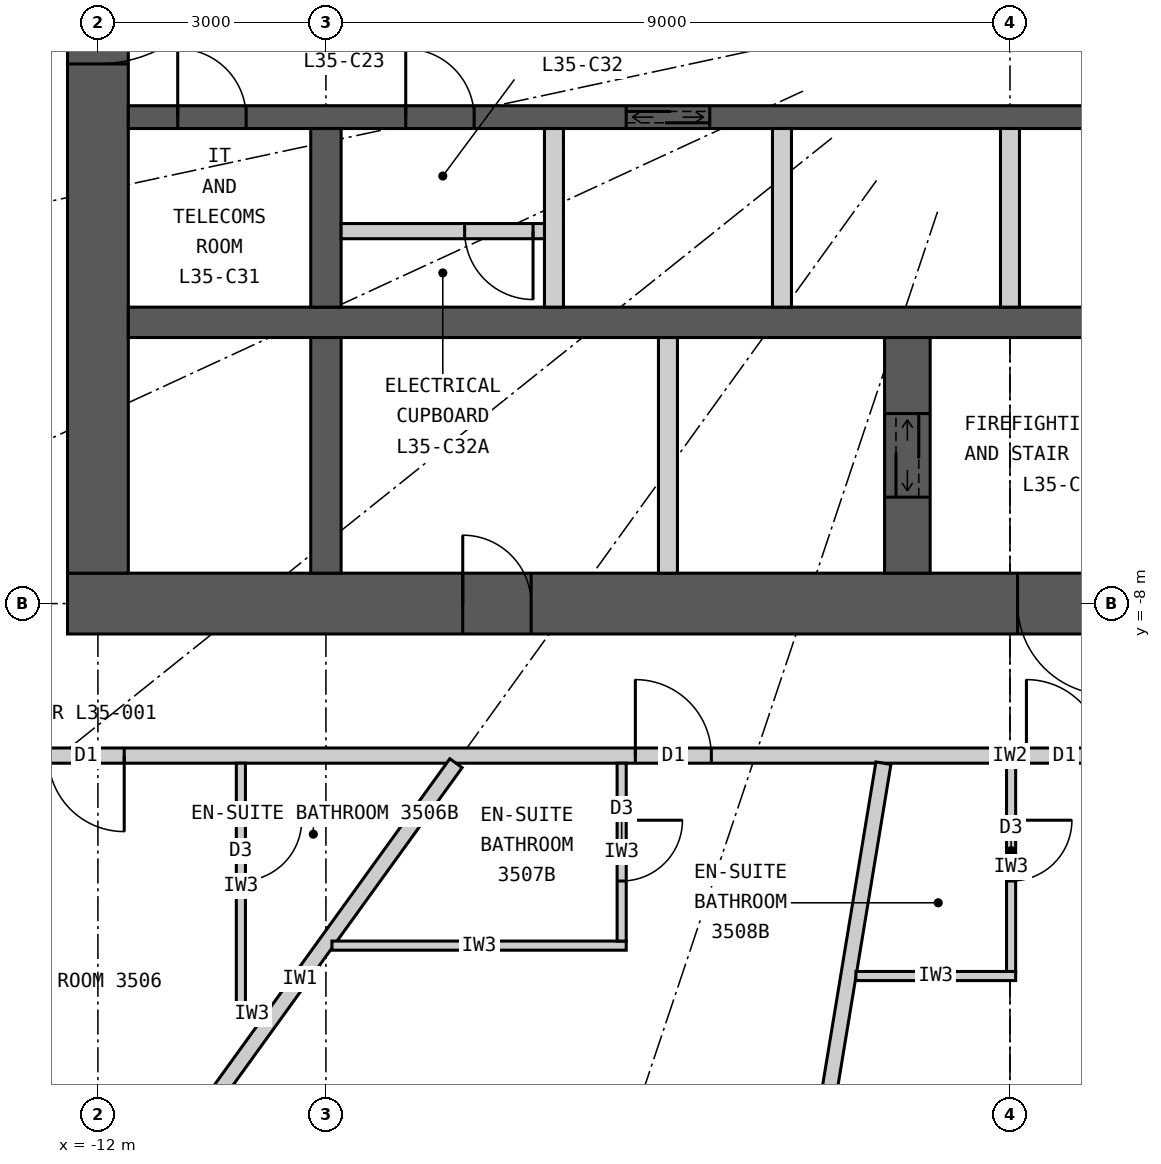
"""IFC4 building model, lengths in metres.
Left out: names, types, materials, properties, quantities, classifications, styles, units other than length and angle.
Written with IfcOpenShell. Run it as: python <this file> out.ifc"""

import sys

from ifc_helpers import new_model, si_unit, direction, frame, frame_2d, origin, place, context, subcontext, project, spatial, rectangle, extrude, element, fill, save


model = new_model("IFC4")
c1 = context("Model", 3, precision=1e-05, world=origin(), true_north=direction((0.0, 1.0)))
c2 = subcontext(c1, "Body", "Model", "MODEL_VIEW")
j1 = project(units=[si_unit("LENGTHUNIT", "METRE"), si_unit("PLANEANGLEUNIT", "RADIAN")], contexts=[c1])
p1 = place(None, origin())
s1 = spatial("IfcSite", under=j1, at=p1, CompositionType="ELEMENT")
p2 = place(p1, origin())
s2 = spatial("IfcBuilding", under=s1, at=p2, CompositionType="ELEMENT")
p3 = place(p2, frame((0.0, 0.0, 135.3)))
s3 = spatial("IfcBuildingStorey", under=s2, at=p3, CompositionType="ELEMENT", Elevation=135.3)
p4 = place(p3, frame((12.4, -8.0, 0.0), z_axis=(0.0, 0.0, 1.0), x_axis=(-1.0, 0.0, 0.0)))
e1 = element("IfcWall", 1, at=p4, inside=s3, PredefinedType="SHEAR", context=c2, shape_type="SweptSolid", body=[
    extrude(rectangle(XDim=24.8, YDim=0.8, at=frame_2d((12.4, 0.0))), origin(), (0.0, 0.0, 1.0), 3.3),
])
p5 = place(p4, frame((11.1, 0.0, 0.0)))
e2 = element("IfcOpeningElement", 2, at=p5, cuts=e1, PredefinedType="OPENING", context=c2, shape_type="SweptSolid", body=[
    extrude(rectangle(XDim=1.2, YDim=2.2, at=frame_2d((0.6, 1.1))), frame((0.0, 0.41, 0.0), z_axis=(0.0, -1.0, 0.0), x_axis=(1.0, 0.0, 0.0)), (0.0, 0.0, 1.0), 0.82),
])
p6 = place(p4, frame((18.7, 0.0, 0.0)))
e3 = element("IfcOpeningElement", 3, at=p6, cuts=e1, PredefinedType="OPENING", context=c2, shape_type="SweptSolid", body=[
    extrude(rectangle(XDim=0.9, YDim=2.2, at=frame_2d((0.45, 1.1))), frame((0.0, 0.41, 0.0), z_axis=(0.0, -1.0, 0.0), x_axis=(1.0, 0.0, 0.0)), (0.0, 0.0, 1.0), 0.82),
])
p7 = place(p3, frame((-12.0, 7.6, 0.0), z_axis=(0.0, 0.0, 1.0), x_axis=(0.0, -1.0, 0.0)))
e4 = element("IfcWall", 4, at=p7, inside=s3, PredefinedType="SHEAR", context=c2, shape_type="SweptSolid", body=[
    extrude(rectangle(XDim=15.2, YDim=0.8, at=frame_2d((7.6, 0.0))), origin(), (0.0, 0.0, 1.0), 3.3),
])
p8 = place(p7, frame((6.7, 0.0, 0.0)))
e5 = element("IfcOpeningElement", 5, at=p8, cuts=e4, PredefinedType="OPENING", context=c2, shape_type="SweptSolid", body=[
    extrude(rectangle(XDim=1.8, YDim=2.2, at=frame_2d((0.9, 1.1))), frame((0.0, 0.41, 0.0), z_axis=(0.0, -1.0, 0.0), x_axis=(1.0, 0.0, 0.0)), (0.0, 0.0, 1.0), 0.82),
])
p9 = place(p3, frame((-11.6, -4.3, 0.0), z_axis=(0.0, 0.0, 1.0), x_axis=(1.0, 0.0, 0.0)))
e6 = element("IfcWall", 6, at=p9, inside=s3, PredefinedType="SHEAR", context=c2, shape_type="SweptSolid", body=[
    extrude(rectangle(XDim=23.2, YDim=0.4, at=frame_2d((11.6, 0.0))), origin(), (0.0, 0.0, 1.0), 3.3),
])
p10 = place(p3, frame((-11.6, -1.6, 0.0), z_axis=(0.0, 0.0, 1.0), x_axis=(1.0, 0.0, 0.0)))
e7 = element("IfcWall", 7, at=p10, inside=s3, PredefinedType="SHEAR", context=c2, shape_type="SweptSolid", body=[
    extrude(rectangle(XDim=23.2, YDim=0.3, at=frame_2d((11.6, 0.0))), origin(), (0.0, 0.0, 1.0), 3.3),
])
p11 = place(p10, frame((6.55, 0.0, 0.0)))
e8 = element("IfcOpeningElement", 8, at=p11, cuts=e7, PredefinedType="OPENING", context=c2, shape_type="SweptSolid", body=[
    extrude(rectangle(XDim=1.1, YDim=2.2, at=frame_2d((0.55, 1.1))), frame((0.0, 0.16, 0.0), z_axis=(0.0, -1.0, 0.0), x_axis=(1.0, 0.0, 0.0)), (0.0, 0.0, 1.0), 0.32),
])
p12 = place(p10, frame((15.3, 0.0, 0.0)))
e9 = element("IfcOpeningElement", 9, at=p12, cuts=e7, PredefinedType="OPENING", context=c2, shape_type="SweptSolid", body=[
    extrude(rectangle(XDim=1.6, YDim=2.4, at=frame_2d((0.8, 1.2))), frame((0.0, 0.16, 0.0), z_axis=(0.0, -1.0, 0.0), x_axis=(1.0, 0.0, 0.0)), (0.0, 0.0, 1.0), 0.32),
])
p13 = place(p10, frame((0.65, 0.0, 0.0)))
e10 = element("IfcOpeningElement", 10, at=p13, cuts=e7, PredefinedType="OPENING", context=c2, shape_type="SweptSolid", body=[
    extrude(rectangle(XDim=0.9, YDim=2.2, at=frame_2d((0.45, 1.1))), frame((0.0, 0.16, 0.0), z_axis=(0.0, -1.0, 0.0), x_axis=(1.0, 0.0, 0.0)), (0.0, 0.0, 1.0), 0.32),
])
p14 = place(p10, frame((3.65, 0.0, 0.0)))
e11 = element("IfcOpeningElement", 11, at=p14, cuts=e7, PredefinedType="OPENING", context=c2, shape_type="SweptSolid", body=[
    extrude(rectangle(XDim=0.9, YDim=2.2, at=frame_2d((0.45, 1.1))), frame((0.0, 0.16, 0.0), z_axis=(0.0, -1.0, 0.0), x_axis=(1.0, 0.0, 0.0)), (0.0, 0.0, 1.0), 0.32),
])
p15 = place(p10, frame((21.65, 0.0, 0.0)))
e12 = element("IfcOpeningElement", 12, at=p15, cuts=e7, PredefinedType="OPENING", context=c2, shape_type="SweptSolid", body=[
    extrude(rectangle(XDim=0.9, YDim=2.2, at=frame_2d((0.45, 1.1))), frame((0.0, 0.16, 0.0), z_axis=(0.0, -1.0, 0.0), x_axis=(1.0, 0.0, 0.0)), (0.0, 0.0, 1.0), 0.32),
])
p16 = place(p3, frame((-9.0, -4.1, 0.0), z_axis=(0.0, 0.0, 1.0), x_axis=(0.0, 1.0, 0.0)))
e13 = element("IfcWall", 13, at=p16, inside=s3, PredefinedType="SHEAR", context=c2, shape_type="SweptSolid", body=[
    extrude(rectangle(XDim=2.35, YDim=0.4, at=frame_2d((1.175, 0.0))), origin(), (0.0, 0.0, 1.0), 3.3),
])
p17 = place(p3, frame((-9.0, -7.6, 0.0), z_axis=(0.0, 0.0, 1.0), x_axis=(0.0, 1.0, 0.0)))
e14 = element("IfcWall", 14, at=p17, inside=s3, PredefinedType="SHEAR", context=c2, shape_type="SweptSolid", body=[
    extrude(rectangle(XDim=3.1, YDim=0.4, at=frame_2d((1.55, 0.0))), origin(), (0.0, 0.0, 1.0), 3.3),
])
p18 = place(p3, frame((-1.35, -7.6, 0.0), z_axis=(0.0, 0.0, 1.0), x_axis=(0.0, 1.0, 0.0)))
e15 = element("IfcWall", 15, at=p18, inside=s3, PredefinedType="SHEAR", context=c2, shape_type="SweptSolid", body=[
    extrude(rectangle(XDim=3.1, YDim=0.6, at=frame_2d((1.55, 0.0))), origin(), (0.0, 0.0, 1.0), 3.3),
])
p19 = place(p18, frame((1.0, 0.0, 0.0)))
e16 = element("IfcOpeningElement", 16, at=p19, cuts=e15, PredefinedType="OPENING", context=c2, shape_type="SweptSolid", body=[
    extrude(rectangle(XDim=1.1, YDim=2.2, at=frame_2d((0.55, 1.1))), frame((0.0, 0.31, 0.0), z_axis=(0.0, -1.0, 0.0), x_axis=(1.0, 0.0, 0.0)), (0.0, 0.0, 1.0), 0.62),
])
p20 = place(p3, frame((-4.5, -7.6, 0.0), z_axis=(0.0, 0.0, 1.0), x_axis=(0.0, 1.0, 0.0)))
e17 = element("IfcWall", 17, at=p20, inside=s3, PredefinedType="PARTITIONING", context=c2, shape_type="SweptSolid", body=[
    extrude(rectangle(XDim=3.1, YDim=0.25, at=frame_2d((1.55, 0.0))), origin(), (0.0, 0.0, 1.0), 3.3),
])
for number, where, z_axis, x_axis in (
    (18, (-6.0, -4.1, 0.0), (0.0, 0.0, 1.0), (0.0, 1.0, 0.0)),
    (19, (-3.0, -4.1, 0.0), (0.0, 0.0, 1.0), (0.0, 1.0, 0.0)),
    (20, (0.0, -4.1, 0.0), (0.0, 0.0, 1.0), (0.0, 1.0, 0.0)),
):
    element("IfcWall", number, at=place(p3, frame(where, z_axis=z_axis, x_axis=x_axis)), inside=s3, PredefinedType="PARTITIONING", context=c2, shape_type="SweptSolid", body=[
        extrude(rectangle(XDim=2.35, YDim=0.25, at=frame_2d((1.175, 0.0))), origin(), (0.0, 0.0, 1.0), 3.3),
    ])
p21 = place(p3, frame((-17.332, -13.866, 0.0), z_axis=(0.0, 0.0, 1.0), x_axis=(0.857308573723, -0.514802884044, 0.0)))
e21 = element("IfcWall", 21, at=p21, inside=s3, PredefinedType="ELEMENTEDWALL", context=c2, shape_type="SweptSolid", body=[
    extrude(rectangle(XDim=5.961, YDim=0.15, at=frame_2d((2.98, 0.0))), origin(), (0.0, 0.0, 1.0), 3.05),
])
p22 = place(p21, frame((1.181, 0.0, 0.9)))
e22 = element("IfcOpeningElement", 22, at=p22, cuts=e21, PredefinedType="OPENING", context=c2, shape_type="SweptSolid", body=[
    extrude(rectangle(XDim=1.5, YDim=1.9, at=frame_2d((0.75, 0.95))), frame((0.0, 0.085, 0.0), z_axis=(0.0, -1.0, 0.0), x_axis=(1.0, 0.0, 0.0)), (0.0, 0.0, 1.0), 0.17),
])
p23 = place(p21, frame((3.281, 0.0, 0.9)))
e23 = element("IfcOpeningElement", 23, at=p23, cuts=e21, PredefinedType="OPENING", context=c2, shape_type="SweptSolid", body=[
    extrude(rectangle(XDim=1.5, YDim=1.9, at=frame_2d((0.75, 0.95))), frame((0.0, 0.085, 0.0), z_axis=(0.0, -1.0, 0.0), x_axis=(1.0, 0.0, 0.0)), (0.0, 0.0, 1.0), 0.17),
])
p24 = place(p3, frame((14.1, -10.0, 0.0), z_axis=(0.0, 0.0, 1.0), x_axis=(-1.0, 0.0, 0.0)))
e24 = element("IfcWall", 24, at=p24, inside=s3, PredefinedType="PARTITIONING", context=c2, shape_type="SweptSolid", body=[
    extrude(rectangle(XDim=28.2, YDim=0.2, at=frame_2d((14.1, 0.0))), origin(), (0.0, 0.0, 1.0), 3.05),
])
p25 = place(p24, frame((25.754, 0.0, 0.0)))
e25 = element("IfcOpeningElement", 25, at=p25, cuts=e24, PredefinedType="OPENING", context=c2, shape_type="SweptSolid", body=[
    extrude(rectangle(XDim=1.0, YDim=2.2, at=frame_2d((0.5, 1.1))), frame((0.0, 0.11, 0.0), z_axis=(0.0, -1.0, 0.0), x_axis=(1.0, 0.0, 0.0)), (0.0, 0.0, 1.0), 0.22),
])
p26 = place(p24, frame((18.029, 0.0, 0.0)))
e26 = element("IfcOpeningElement", 26, at=p26, cuts=e24, PredefinedType="OPENING", context=c2, shape_type="SweptSolid", body=[
    extrude(rectangle(XDim=1.0, YDim=2.2, at=frame_2d((0.5, 1.1))), frame((0.0, 0.11, 0.0), z_axis=(0.0, -1.0, 0.0), x_axis=(1.0, 0.0, 0.0)), (0.0, 0.0, 1.0), 0.22),
])
p27 = place(p24, frame((12.884, 0.0, 0.0)))
e27 = element("IfcOpeningElement", 27, at=p27, cuts=e24, PredefinedType="OPENING", context=c2, shape_type="SweptSolid", body=[
    extrude(rectangle(XDim=1.0, YDim=2.2, at=frame_2d((0.5, 1.1))), frame((0.0, 0.11, 0.0), z_axis=(0.0, -1.0, 0.0), x_axis=(1.0, 0.0, 0.0)), (0.0, 0.0, 1.0), 0.22),
])
p28 = place(p24, frame((9.075, 0.0, 0.0)))
e28 = element("IfcOpeningElement", 28, at=p28, cuts=e24, PredefinedType="OPENING", context=c2, shape_type="SweptSolid", body=[
    extrude(rectangle(XDim=1.0, YDim=2.2, at=frame_2d((0.5, 1.1))), frame((0.0, 0.11, 0.0), z_axis=(0.0, -1.0, 0.0), x_axis=(1.0, 0.0, 0.0)), (0.0, 0.0, 1.0), 0.22),
])
p29 = place(p24, frame((3.59, 0.0, 0.0)))
e29 = element("IfcOpeningElement", 29, at=p29, cuts=e24, PredefinedType="OPENING", context=c2, shape_type="SweptSolid", body=[
    extrude(rectangle(XDim=1.0, YDim=2.2, at=frame_2d((0.5, 1.1))), frame((0.0, 0.11, 0.0), z_axis=(0.0, -1.0, 0.0), x_axis=(1.0, 0.0, 0.0)), (0.0, 0.0, 1.0), 0.22),
])
p30 = place(p3, frame((-7.289, -10.1, 0.0), z_axis=(0.0, 0.0, 1.0), x_axis=(-0.585217367024, -0.81087645997, 0.0)))
e30 = element("IfcWall", 30, at=p30, inside=s3, PredefinedType="PARTITIONING", context=c2, shape_type="SweptSolid", body=[
    extrude(rectangle(XDim=7.016, YDim=0.2, at=frame_2d((3.508, 0.0))), origin(), (0.0, 0.0, 1.0), 2.15),
])
p31 = place(p3, frame((-1.665, -10.1, 0.0), z_axis=(0.0, 0.0, 1.0), x_axis=(-0.162660519103, -0.986682094459, 0.0)))
e31 = element("IfcWall", 31, at=p31, inside=s3, PredefinedType="PARTITIONING", context=c2, shape_type="SweptSolid", body=[
    extrude(rectangle(XDim=9.111, YDim=0.2, at=frame_2d((4.555, 0.0))), origin(), (0.0, 0.0, 1.0), 3.05),
])
p32 = place(p3, frame((-9.771, -13.4, 0.0), z_axis=(0.0, 0.0, 1.0), x_axis=(-1.0, 0.0, 0.0)))
e32 = element("IfcWall", 32, at=p32, inside=s3, PredefinedType="PARTITIONING", context=c2, shape_type="SweptSolid", body=[
    extrude(rectangle(XDim=0.408, YDim=0.12, at=frame_2d((0.204, 0.0))), origin(), (0.0, 0.0, 1.0), 3.05),
])
p33 = place(p3, frame((-10.119, -10.1, 0.0), z_axis=(0.0, 0.0, 1.0), x_axis=(0.0, -1.0, 0.0)))
e33 = element("IfcWall", 33, at=p33, inside=s3, PredefinedType="PARTITIONING", context=c2, shape_type="SweptSolid", body=[
    extrude(rectangle(XDim=3.24, YDim=0.12, at=frame_2d((1.62, 0.0))), origin(), (0.0, 0.0, 1.0), 3.05),
])
p34 = place(p33, frame((0.75, 0.0, 0.0)))
e34 = element("IfcOpeningElement", 34, at=p34, cuts=e33, PredefinedType="OPENING", context=c2, shape_type="SweptSolid", body=[
    extrude(rectangle(XDim=0.8, YDim=2.1, at=frame_2d((0.4, 1.05))), frame((0.0, 0.07, 0.0), z_axis=(0.0, -1.0, 0.0), x_axis=(1.0, 0.0, 0.0)), (0.0, 0.0, 1.0), 0.14),
])
p35 = place(p3, frame((-8.921, -12.5, 0.0), z_axis=(0.0, 0.0, 1.0), x_axis=(1.0, 0.0, 0.0)))
e35 = element("IfcWall", 35, at=p35, inside=s3, PredefinedType="PARTITIONING", context=c2, shape_type="SweptSolid", body=[
    extrude(rectangle(XDim=3.872, YDim=0.12, at=frame_2d((1.936, 0.0))), origin(), (0.0, 0.0, 1.0), 3.05),
])
p36 = place(p3, frame((-5.109, -10.1, 0.0), z_axis=(0.0, 0.0, 1.0), x_axis=(0.0, -1.0, 0.0)))
e36 = element("IfcWall", 36, at=p36, inside=s3, PredefinedType="PARTITIONING", context=c2, shape_type="SweptSolid", body=[
    extrude(rectangle(XDim=2.34, YDim=0.12, at=frame_2d((1.17, 0.0))), origin(), (0.0, 0.0, 1.0), 3.05),
])
p37 = place(p36, frame((0.75, 0.0, 0.0)))
e37 = element("IfcOpeningElement", 37, at=p37, cuts=e36, PredefinedType="OPENING", context=c2, shape_type="SweptSolid", body=[
    extrude(rectangle(XDim=0.8, YDim=2.1, at=frame_2d((0.4, 1.05))), frame((0.0, 0.07, 0.0), z_axis=(0.0, -1.0, 0.0), x_axis=(1.0, 0.0, 0.0)), (0.0, 0.0, 1.0), 0.14),
])
p38 = place(p3, frame((-2.027, -12.9, 0.0), z_axis=(0.0, 0.0, 1.0), x_axis=(1.0, 0.0, 0.0)))
e38 = element("IfcWall", 38, at=p38, inside=s3, PredefinedType="PARTITIONING", context=c2, shape_type="SweptSolid", body=[
    extrude(rectangle(XDim=2.102, YDim=0.12, at=frame_2d((1.051, 0.0))), origin(), (0.0, 0.0, 1.0), 3.05),
])
p39 = place(p3, frame((0.015, -10.1, 0.0), z_axis=(0.0, 0.0, 1.0), x_axis=(0.0, -1.0, 0.0)))
e39 = element("IfcWall", 39, at=p39, inside=s3, PredefinedType="PARTITIONING", context=c2, shape_type="SweptSolid", body=[
    extrude(rectangle(XDim=2.74, YDim=0.12, at=frame_2d((1.37, 0.0))), origin(), (0.0, 0.0, 1.0), 2.15),
])
p40 = place(p39, frame((0.75, 0.0, 0.0)))
e40 = element("IfcOpeningElement", 40, at=p40, cuts=e39, PredefinedType="OPENING", context=c2, shape_type="SweptSolid", body=[
    extrude(rectangle(XDim=0.8, YDim=2.1, at=frame_2d((0.4, 1.05))), frame((0.0, 0.07, 0.0), z_axis=(0.0, -1.0, 0.0), x_axis=(1.0, 0.0, 0.0)), (0.0, 0.0, 1.0), 0.14),
])
p41 = place(p3, frame((-8.8, -3.1, 0.0), z_axis=(0.0, 0.0, 1.0), x_axis=(1.0, 0.0, 0.0)))
e41 = element("IfcWall", 41, at=p41, inside=s3, PredefinedType="PARTITIONING", context=c2, shape_type="SweptSolid", body=[
    extrude(rectangle(XDim=2.675, YDim=0.2, at=frame_2d((1.337, 0.0))), origin(), (0.0, 0.0, 1.0), 3.05),
])
p42 = place(p41, frame((1.625, 0.0, 0.0)))
e42 = element("IfcOpeningElement", 42, at=p42, cuts=e41, PredefinedType="OPENING", context=c2, shape_type="SweptSolid", body=[
    extrude(rectangle(XDim=0.9, YDim=2.2, at=frame_2d((0.45, 1.1))), frame((0.0, 0.11, 0.0), z_axis=(0.0, -1.0, 0.0), x_axis=(1.0, 0.0, 0.0)), (0.0, 0.0, 1.0), 0.22),
])
p43 = place(p34, origin())
e43 = element("IfcDoor", 43, at=p43, inside=s3, OperationType="SINGLE_SWING_LEFT", PredefinedType="DOOR", context=c2, shape_type="SweptSolid", body=[
    extrude(rectangle(XDim=0.8, YDim=2.1, at=frame_2d((0.4, 1.05))), frame((0.0, 0.025, 0.0), z_axis=(0.0, -1.0, 0.0), x_axis=(1.0, 0.0, 0.0)), (0.0, 0.0, 1.0), 0.05),
])
fill(e34, e43)
p44 = place(p25, origin())
e44 = element("IfcDoor", 44, at=p44, inside=s3, OperationType="SINGLE_SWING_LEFT", PredefinedType="DOOR", context=c2, shape_type="SweptSolid", body=[
    extrude(rectangle(XDim=1.0, YDim=2.2, at=frame_2d((0.5, 1.1))), frame((0.0, 0.025, 0.0), z_axis=(0.0, -1.0, 0.0), x_axis=(1.0, 0.0, 0.0)), (0.0, 0.0, 1.0), 0.05),
])
fill(e25, e44)
p45 = place(p37, origin())
e45 = element("IfcDoor", 45, at=p45, inside=s3, OperationType="SINGLE_SWING_LEFT", PredefinedType="DOOR", context=c2, shape_type="SweptSolid", body=[
    extrude(rectangle(XDim=0.8, YDim=2.1, at=frame_2d((0.4, 1.05))), frame((0.0, 0.025, 0.0), z_axis=(0.0, -1.0, 0.0), x_axis=(1.0, 0.0, 0.0)), (0.0, 0.0, 1.0), 0.05),
])
fill(e37, e45)
p46 = place(p26, origin())
e46 = element("IfcDoor", 46, at=p46, inside=s3, OperationType="SINGLE_SWING_RIGHT", PredefinedType="DOOR", context=c2, shape_type="SweptSolid", body=[
    extrude(rectangle(XDim=1.0, YDim=2.2, at=frame_2d((0.5, 1.1))), frame((0.0, 0.025, 0.0), z_axis=(0.0, -1.0, 0.0), x_axis=(1.0, 0.0, 0.0)), (0.0, 0.0, 1.0), 0.05),
])
fill(e26, e46)
p47 = place(p40, origin())
e47 = element("IfcDoor", 47, at=p47, inside=s3, OperationType="SINGLE_SWING_LEFT", PredefinedType="DOOR", context=c2, shape_type="SweptSolid", body=[
    extrude(rectangle(XDim=0.8, YDim=2.1, at=frame_2d((0.4, 1.05))), frame((0.0, 0.025, 0.0), z_axis=(0.0, -1.0, 0.0), x_axis=(1.0, 0.0, 0.0)), (0.0, 0.0, 1.0), 0.05),
])
fill(e40, e47)
p48 = place(p27, origin())
e48 = element("IfcDoor", 48, at=p48, inside=s3, OperationType="SINGLE_SWING_RIGHT", PredefinedType="DOOR", context=c2, shape_type="SweptSolid", body=[
    extrude(rectangle(XDim=1.0, YDim=2.2, at=frame_2d((0.5, 1.1))), frame((0.0, 0.025, 0.0), z_axis=(0.0, -1.0, 0.0), x_axis=(1.0, 0.0, 0.0)), (0.0, 0.0, 1.0), 0.05),
])
fill(e27, e48)
p49 = place(p5, origin())
e49 = element("IfcDoor", 49, at=p49, inside=s3, OperationType="SINGLE_SWING_LEFT", PredefinedType="DOOR", context=c2, shape_type="SweptSolid", body=[
    extrude(rectangle(XDim=1.2, YDim=2.2, at=frame_2d((0.6, 1.1))), frame((0.0, 0.025, 0.0), z_axis=(0.0, -1.0, 0.0), x_axis=(1.0, 0.0, 0.0)), (0.0, 0.0, 1.0), 0.05),
])
fill(e2, e49)
p50 = place(p19, origin())
e50 = element("IfcDoor", 50, at=p50, inside=s3, OperationType="DOUBLE_DOOR_SLIDING", PredefinedType="DOOR", context=c2, shape_type="SweptSolid", body=[
    extrude(rectangle(XDim=1.1, YDim=2.2, at=frame_2d((0.55, 1.1))), frame((0.0, 0.025, 0.0), z_axis=(0.0, -1.0, 0.0), x_axis=(1.0, 0.0, 0.0)), (0.0, 0.0, 1.0), 0.05),
])
fill(e16, e50)
p51 = place(p6, origin())
e51 = element("IfcDoor", 51, at=p51, inside=s3, OperationType="SINGLE_SWING_RIGHT", PredefinedType="DOOR", context=c2, shape_type="SweptSolid", body=[
    extrude(rectangle(XDim=0.9, YDim=2.2, at=frame_2d((0.45, 1.1))), frame((0.0, 0.025, 0.0), z_axis=(0.0, -1.0, 0.0), x_axis=(1.0, 0.0, 0.0)), (0.0, 0.0, 1.0), 0.05),
])
fill(e3, e51)
p52 = place(p11, origin())
e52 = element("IfcDoor", 52, at=p52, inside=s3, OperationType="DOUBLE_DOOR_SLIDING", PredefinedType="DOOR", context=c2, shape_type="SweptSolid", body=[
    extrude(rectangle(XDim=1.1, YDim=2.2, at=frame_2d((0.55, 1.1))), frame((0.0, 0.025, 0.0), z_axis=(0.0, -1.0, 0.0), x_axis=(1.0, 0.0, 0.0)), (0.0, 0.0, 1.0), 0.05),
])
fill(e8, e52)
p53 = place(p13, origin())
e53 = element("IfcDoor", 53, at=p53, inside=s3, OperationType="SINGLE_SWING_LEFT", PredefinedType="DOOR", context=c2, shape_type="SweptSolid", body=[
    extrude(rectangle(XDim=0.9, YDim=2.2, at=frame_2d((0.45, 1.1))), frame((0.0, 0.025, 0.0), z_axis=(0.0, -1.0, 0.0), x_axis=(1.0, 0.0, 0.0)), (0.0, 0.0, 1.0), 0.05),
])
fill(e10, e53)
p54 = place(p42, origin())
e54 = element("IfcDoor", 54, at=p54, inside=s3, OperationType="SINGLE_SWING_RIGHT", PredefinedType="DOOR", context=c2, shape_type="SweptSolid", body=[
    extrude(rectangle(XDim=0.9, YDim=2.2, at=frame_2d((0.45, 1.1))), frame((0.0, 0.025, 0.0), z_axis=(0.0, -1.0, 0.0), x_axis=(1.0, 0.0, 0.0)), (0.0, 0.0, 1.0), 0.05),
])
fill(e42, e54)
p55 = place(p14, origin())
e55 = element("IfcDoor", 55, at=p55, inside=s3, OperationType="SINGLE_SWING_LEFT", PredefinedType="DOOR", context=c2, shape_type="SweptSolid", body=[
    extrude(rectangle(XDim=0.9, YDim=2.2, at=frame_2d((0.45, 1.1))), frame((0.0, 0.025, 0.0), z_axis=(0.0, -1.0, 0.0), x_axis=(1.0, 0.0, 0.0)), (0.0, 0.0, 1.0), 0.05),
])
fill(e11, e55)
p56 = place(p8, origin())
e56 = element("IfcDoor", 56, at=p56, inside=s3, OperationType="DOUBLE_DOOR_DOUBLE_SWING", PredefinedType="DOOR", context=c2, shape_type="SweptSolid", body=[
    extrude(rectangle(XDim=1.8, YDim=2.2, at=frame_2d((0.9, 1.1))), frame((0.0, 0.025, 0.0), z_axis=(0.0, -1.0, 0.0), x_axis=(1.0, 0.0, 0.0)), (0.0, 0.0, 1.0), 0.05),
])
fill(e5, e56)
save(model, sys.argv[1])
